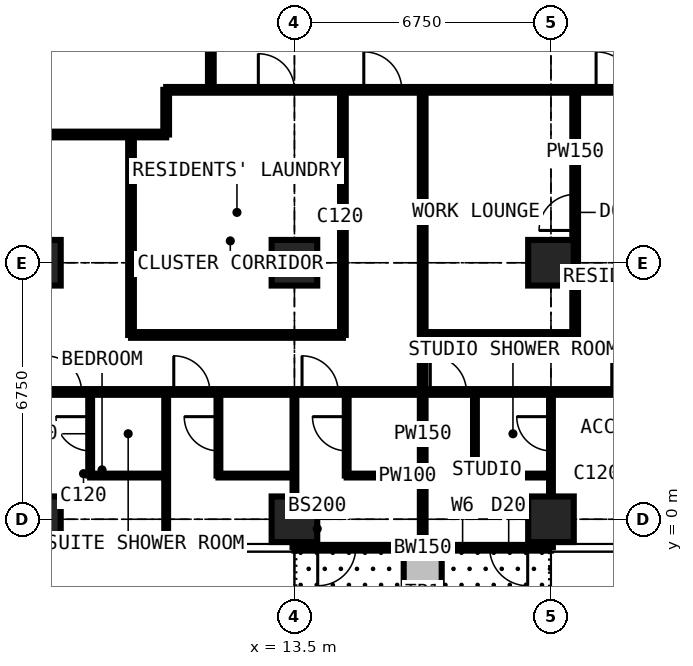
"""IFC4 building model, lengths in metres.
Left out: names, types, materials, properties, quantities, classifications, styles, units other than length and angle.
Written with IfcOpenShell. Run it as: python <this file> out.ifc"""

import sys

from ifc_helpers import new_model, si_unit, direction, frame, frame_2d, origin, origin_2d, place, context, subcontext, project, spatial, rectangle, extrude, element, fill, save


model = new_model("IFC4")
c1 = context("Model", 3, precision=1e-05, world=origin(), true_north=direction((0.0, 1.0)))
c2 = subcontext(c1, "Body", "Model", "MODEL_VIEW")
j1 = project(units=[si_unit("LENGTHUNIT", "METRE"), si_unit("PLANEANGLEUNIT", "RADIAN")], contexts=[c1])
p1 = place(None, origin())
s1 = spatial("IfcSite", under=j1, at=p1, CompositionType="ELEMENT")
p2 = place(p1, origin())
s2 = spatial("IfcBuilding", under=s1, at=p2, CompositionType="ELEMENT")
p3 = place(p2, frame((0.0, 0.0, 178.2)))
s3 = spatial("IfcBuildingStorey", under=s2, at=p3, CompositionType="ELEMENT", Elevation=178.2)
for number, where, z_axis, x_axis in (
    (1, (6.75, 0.0, 0.0), (0.0, 0.0, 1.0), (1.0, 0.0, 0.0)),
    (2, (6.75, 6.75, 0.0), (0.0, 0.0, 1.0), (1.0, 0.0, 0.0)),
    (3, (13.5, 0.0, 0.0), (0.0, 0.0, 1.0), (1.0, 0.0, 0.0)),
    (4, (13.5, 6.75, 0.0), (0.0, 0.0, 1.0), (1.0, 0.0, 0.0)),
    (5, (20.25, 0.0, 0.0), (0.0, 0.0, 1.0), (1.0, 0.0, 0.0)),
    (6, (20.25, 6.75, 0.0), (0.0, 0.0, 1.0), (1.0, 0.0, 0.0)),
):
    element("IfcColumn", number, at=place(p3, frame(where, z_axis=z_axis, x_axis=x_axis)), inside=s3, PredefinedType="COLUMN", context=c2, shape_type="SweptSolid", body=[
        extrude(rectangle(XDim=1.2, YDim=1.2, at=origin_2d()), origin(), (0.0, 0.0, 1.0), 3.6),
    ])
p4 = place(p3, frame((20.25, -0.75, 0.0), z_axis=(0.0, 0.0, 1.0), x_axis=(-1.0, 0.0, 0.0)))
e7 = element("IfcWall", 7, at=p4, inside=s3, PredefinedType="SOLIDWALL", context=c2, shape_type="SweptSolid", body=[
    extrude(rectangle(XDim=6.75, YDim=0.15, at=frame_2d((3.375, 0.0))), origin(), (0.0, 0.0, 1.0), 3.375),
])
p5 = place(p4, frame((0.613, 0.0, 0.0)))
e8 = element("IfcOpeningElement", 8, at=p5, cuts=e7, PredefinedType="OPENING", context=c2, shape_type="SweptSolid", body=[
    extrude(rectangle(XDim=1.0, YDim=2.2, at=frame_2d((0.5, 1.1))), frame((0.0, 0.085, 0.0), z_axis=(0.0, -1.0, 0.0), x_axis=(1.0, 0.0, 0.0)), (0.0, 0.0, 1.0), 0.17),
])
p6 = place(p4, frame((1.725, 0.0, 0.9)))
e9 = element("IfcOpeningElement", 9, at=p6, cuts=e7, PredefinedType="OPENING", context=c2, shape_type="SweptSolid", body=[
    extrude(rectangle(XDim=1.2, YDim=1.8, at=frame_2d((0.6, 0.9))), frame((0.0, 0.085, 0.0), z_axis=(0.0, -1.0, 0.0), x_axis=(1.0, 0.0, 0.0)), (0.0, 0.0, 1.0), 0.17),
])
p7 = place(p4, frame((5.137, 0.0, 0.0)))
e10 = element("IfcOpeningElement", 10, at=p7, cuts=e7, PredefinedType="OPENING", context=c2, shape_type="SweptSolid", body=[
    extrude(rectangle(XDim=1.0, YDim=2.2, at=frame_2d((0.5, 1.1))), frame((0.0, 0.085, 0.0), z_axis=(0.0, -1.0, 0.0), x_axis=(1.0, 0.0, 0.0)), (0.0, 0.0, 1.0), 0.17),
])
p8 = place(p4, frame((3.825, 0.0, 0.9)))
e11 = element("IfcOpeningElement", 11, at=p8, cuts=e7, PredefinedType="OPENING", context=c2, shape_type="SweptSolid", body=[
    extrude(rectangle(XDim=1.2, YDim=1.8, at=frame_2d((0.6, 0.9))), frame((0.0, 0.085, 0.0), z_axis=(0.0, -1.0, 0.0), x_axis=(1.0, 0.0, 0.0)), (0.0, 0.0, 1.0), 0.17),
])
p9 = place(p3, frame((16.875, -0.85, 0.0), z_axis=(0.0, 0.0, 1.0), x_axis=(0.0, -1.0, 0.0)))
e12 = element("IfcWall", 12, at=p9, inside=s3, PredefinedType="USERDEFINED", context=c2, shape_type="SweptSolid", body=[
    extrude(rectangle(XDim=2.2, YDim=1.0, at=frame_2d((1.1, 0.0))), origin(), (0.0, 0.0, 1.0), 0.9),
])
p10 = place(p3, frame((-0.734, 10.125, 0.0), z_axis=(0.0, 0.0, 1.0), x_axis=(1.0, 0.0, 0.0)))
e13 = element("IfcWall", 13, at=p10, inside=s3, PredefinedType="PARTITIONING", context=c2, shape_type="SweptSolid", body=[
    extrude(rectangle(XDim=10.859, YDim=0.15, at=frame_2d((5.429, 0.0))), origin(), (0.0, 0.0, 1.0), 3.375),
])
p11 = place(p10, frame((4.884, 0.0, 0.0)))
e14 = element("IfcOpeningElement", 14, at=p11, cuts=e13, PredefinedType="OPENING", context=c2, shape_type="SweptSolid", body=[
    extrude(rectangle(XDim=1.0, YDim=2.2, at=frame_2d((0.5, 1.1))), frame((0.0, 0.085, 0.0), z_axis=(0.0, -1.0, 0.0), x_axis=(1.0, 0.0, 0.0)), (0.0, 0.0, 1.0), 0.17),
])
p12 = place(p3, frame((6.75, 3.35, 0.0), z_axis=(0.0, 0.0, 1.0), x_axis=(1.0, 0.0, 0.0)))
e15 = element("IfcWall", 15, at=p12, inside=s3, PredefinedType="PARTITIONING", context=c2, shape_type="SweptSolid", body=[
    extrude(rectangle(XDim=20.25, YDim=0.15, at=frame_2d((10.125, 0.0))), origin(), (0.0, 0.0, 1.0), 3.375),
])
p13 = place(p12, frame((0.2, 0.0, 0.0)))
e16 = element("IfcOpeningElement", 16, at=p13, cuts=e15, PredefinedType="OPENING", context=c2, shape_type="SweptSolid", body=[
    extrude(rectangle(XDim=0.95, YDim=2.2, at=frame_2d((0.475, 1.1))), frame((0.0, 0.085, 0.0), z_axis=(0.0, -1.0, 0.0), x_axis=(1.0, 0.0, 0.0)), (0.0, 0.0, 1.0), 0.17),
])
p14 = place(p12, frame((3.575, 0.0, 0.0)))
e17 = element("IfcOpeningElement", 17, at=p14, cuts=e15, PredefinedType="OPENING", context=c2, shape_type="SweptSolid", body=[
    extrude(rectangle(XDim=0.95, YDim=2.2, at=frame_2d((0.475, 1.1))), frame((0.0, 0.085, 0.0), z_axis=(0.0, -1.0, 0.0), x_axis=(1.0, 0.0, 0.0)), (0.0, 0.0, 1.0), 0.17),
])
p15 = place(p12, frame((6.95, 0.0, 0.0)))
e18 = element("IfcOpeningElement", 18, at=p15, cuts=e15, PredefinedType="OPENING", context=c2, shape_type="SweptSolid", body=[
    extrude(rectangle(XDim=0.95, YDim=2.2, at=frame_2d((0.475, 1.1))), frame((0.0, 0.085, 0.0), z_axis=(0.0, -1.0, 0.0), x_axis=(1.0, 0.0, 0.0)), (0.0, 0.0, 1.0), 0.17),
])
p16 = place(p12, frame((15.1, 0.0, 0.0)))
e19 = element("IfcOpeningElement", 19, at=p16, cuts=e15, PredefinedType="OPENING", context=c2, shape_type="SweptSolid", body=[
    extrude(rectangle(XDim=0.95, YDim=2.2, at=frame_2d((0.475, 1.1))), frame((0.0, 0.085, 0.0), z_axis=(0.0, -1.0, 0.0), x_axis=(1.0, 0.0, 0.0)), (0.0, 0.0, 1.0), 0.17),
])
p17 = place(p12, frame((10.325, 0.0, 0.0)))
e20 = element("IfcOpeningElement", 20, at=p17, cuts=e15, PredefinedType="OPENING", context=c2, shape_type="SweptSolid", body=[
    extrude(rectangle(XDim=0.95, YDim=2.2, at=frame_2d((0.475, 1.1))), frame((0.0, 0.085, 0.0), z_axis=(0.0, -1.0, 0.0), x_axis=(1.0, 0.0, 0.0)), (0.0, 0.0, 1.0), 0.17),
])
p18 = place(p3, frame((8.125, 1.15, 0.0), z_axis=(0.0, 0.0, 1.0), x_axis=(0.0, 1.0, 0.0)))
e21 = element("IfcWall", 21, at=p18, inside=s3, PredefinedType="PARTITIONING", context=c2, shape_type="SweptSolid", body=[
    extrude(rectangle(XDim=2.2, YDim=0.1, at=frame_2d((1.1, 0.0))), origin(), (0.0, 0.0, 1.0), 3.375),
])
p19 = place(p18, frame((0.65, 0.0, 0.0)))
e22 = element("IfcOpeningElement", 22, at=p19, cuts=e21, PredefinedType="OPENING", context=c2, shape_type="SweptSolid", body=[
    extrude(rectangle(XDim=0.9, YDim=2.2, at=frame_2d((0.45, 1.1))), frame((0.0, 0.06, 0.0), z_axis=(0.0, -1.0, 0.0), x_axis=(1.0, 0.0, 0.0)), (0.0, 0.0, 1.0), 0.12),
])
p20 = place(p3, frame((8.125, 1.15, 0.0), z_axis=(0.0, 0.0, 1.0), x_axis=(1.0, 0.0, 0.0)))
e23 = element("IfcWall", 23, at=p20, inside=s3, PredefinedType="PARTITIONING", context=c2, shape_type="SweptSolid", body=[
    extrude(rectangle(XDim=2.0, YDim=0.1, at=frame_2d((1.0, 0.0))), origin(), (0.0, 0.0, 1.0), 3.375),
])
p21 = place(p3, frame((9.2, 4.85, 0.0), z_axis=(0.0, 0.0, 1.0), x_axis=(0.0, 1.0, 0.0)))
e24 = element("IfcWall", 24, at=p21, inside=s3, PredefinedType="PARTITIONING", context=c2, shape_type="SweptSolid", body=[
    extrude(rectangle(XDim=5.275, YDim=0.15, at=frame_2d((2.637, 0.0))), origin(), (0.0, 0.0, 1.0), 3.375),
])
p22 = place(p3, frame((9.2, 4.85, 0.0), z_axis=(0.0, 0.0, 1.0), x_axis=(1.0, 0.0, 0.0)))
e25 = element("IfcWall", 25, at=p22, inside=s3, PredefinedType="PARTITIONING", context=c2, shape_type="SweptSolid", body=[
    extrude(rectangle(XDim=5.575, YDim=0.15, at=frame_2d((2.788, 0.0))), origin(), (0.0, 0.0, 1.0), 3.375),
])
p23 = place(p3, frame((10.125, -0.734, 0.0), z_axis=(0.0, 0.0, 1.0), x_axis=(0.0, 1.0, 0.0)))
e26 = element("IfcWall", 26, at=p23, inside=s3, PredefinedType="PARTITIONING", context=c2, shape_type="SweptSolid", body=[
    extrude(rectangle(XDim=4.084, YDim=0.1, at=frame_2d((2.042, 0.0))), origin(), (0.0, 0.0, 1.0), 3.375),
])
p24 = place(p3, frame((10.125, 10.125, 0.0), z_axis=(0.0, 0.0, 1.0), x_axis=(0.0, 1.0, 0.0)))
e27 = element("IfcWall", 27, at=p24, inside=s3, PredefinedType="PARTITIONING", context=c2, shape_type="SweptSolid", body=[
    extrude(rectangle(XDim=1.175, YDim=0.15, at=frame_2d((0.587, 0.0))), origin(), (0.0, 0.0, 1.0), 3.375),
])
p25 = place(p3, frame((10.125, 11.3, 0.0), z_axis=(0.0, 0.0, 1.0), x_axis=(1.0, 0.0, 0.0)))
e28 = element("IfcWall", 28, at=p25, inside=s3, PredefinedType="PARTITIONING", context=c2, shape_type="SweptSolid", body=[
    extrude(rectangle(XDim=20.25, YDim=0.15, at=frame_2d((10.125, 0.0))), origin(), (0.0, 0.0, 1.0), 3.375),
])
p26 = place(p25, frame((5.2, 0.0, 0.0)))
e29 = element("IfcOpeningElement", 29, at=p26, cuts=e28, PredefinedType="OPENING", context=c2, shape_type="SweptSolid", body=[
    extrude(rectangle(XDim=1.0, YDim=2.2, at=frame_2d((0.5, 1.1))), frame((0.0, 0.085, 0.0), z_axis=(0.0, -1.0, 0.0), x_axis=(1.0, 0.0, 0.0)), (0.0, 0.0, 1.0), 0.17),
])
p27 = place(p25, frame((11.312, 0.0, 0.0)))
e30 = element("IfcOpeningElement", 30, at=p27, cuts=e28, PredefinedType="OPENING", context=c2, shape_type="SweptSolid", body=[
    extrude(rectangle(XDim=1.0, YDim=2.2, at=frame_2d((0.5, 1.1))), frame((0.0, 0.085, 0.0), z_axis=(0.0, -1.0, 0.0), x_axis=(1.0, 0.0, 0.0)), (0.0, 0.0, 1.0), 0.17),
])
p28 = place(p25, frame((2.425, 0.0, 0.0)))
e31 = element("IfcOpeningElement", 31, at=p28, cuts=e28, PredefinedType="OPENING", context=c2, shape_type="SweptSolid", body=[
    extrude(rectangle(XDim=0.95, YDim=2.2, at=frame_2d((0.475, 1.1))), frame((0.0, 0.085, 0.0), z_axis=(0.0, -1.0, 0.0), x_axis=(1.0, 0.0, 0.0)), (0.0, 0.0, 1.0), 0.17),
])
p29 = place(p3, frame((11.3, 11.3, 0.0), z_axis=(0.0, 0.0, 1.0), x_axis=(0.0, 1.0, 0.0)))
e32 = element("IfcWall", 32, at=p29, inside=s3, PredefinedType="PARTITIONING", context=c2, shape_type="SweptSolid", body=[
    extrude(rectangle(XDim=19.3, YDim=0.15, at=frame_2d((9.65, 0.0))), origin(), (0.0, 0.0, 1.0), 3.375),
])
p30 = place(p29, frame((13.525, 0.0, 0.0)))
e33 = element("IfcOpeningElement", 33, at=p30, cuts=e32, PredefinedType="OPENING", context=c2, shape_type="SweptSolid", body=[
    extrude(rectangle(XDim=1.0, YDim=2.2, at=frame_2d((0.5, 1.1))), frame((0.0, 0.085, 0.0), z_axis=(0.0, -1.0, 0.0), x_axis=(1.0, 0.0, 0.0)), (0.0, 0.0, 1.0), 0.17),
])
p31 = place(p29, frame((10.438, 0.0, 0.0)))
e34 = element("IfcOpeningElement", 34, at=p31, cuts=e32, PredefinedType="OPENING", context=c2, shape_type="SweptSolid", body=[
    extrude(rectangle(XDim=1.0, YDim=2.2, at=frame_2d((0.5, 1.1))), frame((0.0, 0.085, 0.0), z_axis=(0.0, -1.0, 0.0), x_axis=(1.0, 0.0, 0.0)), (0.0, 0.0, 1.0), 0.17),
])
p32 = place(p3, frame((11.5, 1.15, 0.0), z_axis=(0.0, 0.0, 1.0), x_axis=(0.0, 1.0, 0.0)))
e35 = element("IfcWall", 35, at=p32, inside=s3, PredefinedType="PARTITIONING", context=c2, shape_type="SweptSolid", body=[
    extrude(rectangle(XDim=2.2, YDim=0.1, at=frame_2d((1.1, 0.0))), origin(), (0.0, 0.0, 1.0), 3.375),
])
p33 = place(p32, frame((0.65, 0.0, 0.0)))
e36 = element("IfcOpeningElement", 36, at=p33, cuts=e35, PredefinedType="OPENING", context=c2, shape_type="SweptSolid", body=[
    extrude(rectangle(XDim=0.9, YDim=2.2, at=frame_2d((0.45, 1.1))), frame((0.0, 0.06, 0.0), z_axis=(0.0, -1.0, 0.0), x_axis=(1.0, 0.0, 0.0)), (0.0, 0.0, 1.0), 0.12),
])
p34 = place(p3, frame((11.5, 1.15, 0.0), z_axis=(0.0, 0.0, 1.0), x_axis=(1.0, 0.0, 0.0)))
e37 = element("IfcWall", 37, at=p34, inside=s3, PredefinedType="PARTITIONING", context=c2, shape_type="SweptSolid", body=[
    extrude(rectangle(XDim=2.0, YDim=0.1, at=frame_2d((1.0, 0.0))), origin(), (0.0, 0.0, 1.0), 3.375),
])
p35 = place(p3, frame((13.5, -0.734, 0.0), z_axis=(0.0, 0.0, 1.0), x_axis=(0.0, 1.0, 0.0)))
e38 = element("IfcWall", 38, at=p35, inside=s3, PredefinedType="PARTITIONING", context=c2, shape_type="SweptSolid", body=[
    extrude(rectangle(XDim=4.084, YDim=0.1, at=frame_2d((2.042, 0.0))), origin(), (0.0, 0.0, 1.0), 2.877),
])
p36 = place(p3, frame((14.775, 4.85, 0.0), z_axis=(0.0, 0.0, 1.0), x_axis=(0.0, 1.0, 0.0)))
e39 = element("IfcWall", 39, at=p36, inside=s3, PredefinedType="PARTITIONING", context=c2, shape_type="SweptSolid", body=[
    extrude(rectangle(XDim=6.45, YDim=0.15, at=frame_2d((3.225, 0.0))), origin(), (0.0, 0.0, 1.0), 3.375),
])
p37 = place(p3, frame((14.875, 1.15, 0.0), z_axis=(0.0, 0.0, 1.0), x_axis=(0.0, 1.0, 0.0)))
e40 = element("IfcWall", 40, at=p37, inside=s3, PredefinedType="PARTITIONING", context=c2, shape_type="SweptSolid", body=[
    extrude(rectangle(XDim=2.2, YDim=0.1, at=frame_2d((1.1, 0.0))), origin(), (0.0, 0.0, 1.0), 3.375),
])
p38 = place(p37, frame((0.65, 0.0, 0.0)))
e41 = element("IfcOpeningElement", 41, at=p38, cuts=e40, PredefinedType="OPENING", context=c2, shape_type="SweptSolid", body=[
    extrude(rectangle(XDim=0.9, YDim=2.2, at=frame_2d((0.45, 1.1))), frame((0.0, 0.06, 0.0), z_axis=(0.0, -1.0, 0.0), x_axis=(1.0, 0.0, 0.0)), (0.0, 0.0, 1.0), 0.12),
])
p39 = place(p3, frame((14.875, 1.15, 0.0), z_axis=(0.0, 0.0, 1.0), x_axis=(1.0, 0.0, 0.0)))
e42 = element("IfcWall", 42, at=p39, inside=s3, PredefinedType="PARTITIONING", context=c2, shape_type="SweptSolid", body=[
    extrude(rectangle(XDim=2.0, YDim=0.1, at=frame_2d((1.0, 0.0))), origin(), (0.0, 0.0, 1.0), 3.375),
])
p40 = place(p3, frame((16.875, -0.734, 0.0), z_axis=(0.0, 0.0, 1.0), x_axis=(0.0, 1.0, 0.0)))
e43 = element("IfcWall", 43, at=p40, inside=s3, PredefinedType="PARTITIONING", context=c2, shape_type="SweptSolid", body=[
    extrude(rectangle(XDim=12.034, YDim=0.15, at=frame_2d((6.017, 0.0))), origin(), (0.0, 0.0, 1.0), 3.375),
])
p41 = place(p3, frame((16.875, 4.85, 0.0), z_axis=(0.0, 0.0, 1.0), x_axis=(1.0, 0.0, 0.0)))
e44 = element("IfcWall", 44, at=p41, inside=s3, PredefinedType="PARTITIONING", context=c2, shape_type="SweptSolid", body=[
    extrude(rectangle(XDim=4.012, YDim=0.15, at=frame_2d((2.006, 0.0))), origin(), (0.0, 0.0, 1.0), 3.375),
])
p42 = place(p3, frame((18.25, 1.15, 0.0), z_axis=(0.0, 0.0, 1.0), x_axis=(0.0, 1.0, 0.0)))
e45 = element("IfcWall", 45, at=p42, inside=s3, PredefinedType="PARTITIONING", context=c2, shape_type="SweptSolid", body=[
    extrude(rectangle(XDim=2.2, YDim=0.1, at=frame_2d((1.1, 0.0))), origin(), (0.0, 0.0, 1.0), 3.375),
])
p43 = place(p3, frame((18.25, 1.15, 0.0), z_axis=(0.0, 0.0, 1.0), x_axis=(1.0, 0.0, 0.0)))
e46 = element("IfcWall", 46, at=p43, inside=s3, PredefinedType="PARTITIONING", context=c2, shape_type="SweptSolid", body=[
    extrude(rectangle(XDim=2.0, YDim=0.1, at=frame_2d((1.0, 0.0))), origin(), (0.0, 0.0, 1.0), 3.375),
])
p44 = place(p3, frame((20.25, -0.734, 0.0), z_axis=(0.0, 0.0, 1.0), x_axis=(0.0, 1.0, 0.0)))
e47 = element("IfcWall", 47, at=p44, inside=s3, PredefinedType="PARTITIONING", context=c2, shape_type="SweptSolid", body=[
    extrude(rectangle(XDim=4.084, YDim=0.1, at=frame_2d((2.042, 0.0))), origin(), (0.0, 0.0, 1.0), 2.877),
])
p45 = place(p44, frame((2.534, 0.0, 0.0)))
e48 = element("IfcOpeningElement", 48, at=p45, cuts=e47, PredefinedType="OPENING", context=c2, shape_type="SweptSolid", body=[
    extrude(rectangle(XDim=0.9, YDim=2.2, at=frame_2d((0.45, 1.1))), frame((0.0, 0.06, 0.0), z_axis=(0.0, -1.0, 0.0), x_axis=(1.0, 0.0, 0.0)), (0.0, 0.0, 1.0), 0.12),
])
p46 = place(p3, frame((20.887, 4.85, 0.0), z_axis=(0.0, 0.0, 1.0), x_axis=(0.0, 1.0, 0.0)))
e49 = element("IfcWall", 49, at=p46, inside=s3, PredefinedType="PARTITIONING", context=c2, shape_type="SweptSolid", body=[
    extrude(rectangle(XDim=6.45, YDim=0.15, at=frame_2d((3.225, 0.0))), origin(), (0.0, 0.0, 1.0), 3.375),
])
p47 = place(p46, frame((2.75, 0.0, 0.0)))
e50 = element("IfcOpeningElement", 50, at=p47, cuts=e49, PredefinedType="OPENING", context=c2, shape_type="SweptSolid", body=[
    extrude(rectangle(XDim=0.95, YDim=2.2, at=frame_2d((0.475, 1.1))), frame((0.0, 0.085, 0.0), z_axis=(0.0, -1.0, 0.0), x_axis=(1.0, 0.0, 0.0)), (0.0, 0.0, 1.0), 0.17),
])
p48 = place(p5, origin())
e51 = element("IfcDoor", 51, at=p48, inside=s3, OperationType="SINGLE_SWING_LEFT", PredefinedType="DOOR", context=c2, shape_type="SweptSolid", body=[
    extrude(rectangle(XDim=1.0, YDim=2.2, at=frame_2d((0.5, 1.1))), frame((0.0, 0.025, 0.0), z_axis=(0.0, -1.0, 0.0), x_axis=(1.0, 0.0, 0.0)), (0.0, 0.0, 1.0), 0.05),
])
fill(e8, e51)
p49 = place(p6, origin())
e52 = element("IfcWindow", 52, at=p49, inside=s3, PartitioningType="SINGLE_PANEL", PredefinedType="WINDOW", context=c2, shape_type="SweptSolid", body=[
    extrude(rectangle(XDim=1.2, YDim=1.8, at=frame_2d((0.6, 0.9))), frame((0.0, 0.03, 0.0), z_axis=(0.0, -1.0, 0.0), x_axis=(1.0, 0.0, 0.0)), (0.0, 0.0, 1.0), 0.06),
])
fill(e9, e52)
p50 = place(p7, origin())
e53 = element("IfcDoor", 53, at=p50, inside=s3, OperationType="SINGLE_SWING_RIGHT", PredefinedType="DOOR", context=c2, shape_type="SweptSolid", body=[
    extrude(rectangle(XDim=1.0, YDim=2.2, at=frame_2d((0.5, 1.1))), frame((0.0, 0.025, 0.0), z_axis=(0.0, -1.0, 0.0), x_axis=(1.0, 0.0, 0.0)), (0.0, 0.0, 1.0), 0.05),
])
fill(e10, e53)
p51 = place(p8, origin())
e54 = element("IfcWindow", 54, at=p51, inside=s3, PartitioningType="SINGLE_PANEL", PredefinedType="WINDOW", context=c2, shape_type="SweptSolid", body=[
    extrude(rectangle(XDim=1.2, YDim=1.8, at=frame_2d((0.6, 0.9))), frame((0.0, 0.03, 0.0), z_axis=(0.0, -1.0, 0.0), x_axis=(1.0, 0.0, 0.0)), (0.0, 0.0, 1.0), 0.06),
])
fill(e11, e54)
p52 = place(p13, origin())
e55 = element("IfcDoor", 55, at=p52, inside=s3, OperationType="SINGLE_SWING_LEFT", PredefinedType="DOOR", context=c2, shape_type="SweptSolid", body=[
    extrude(rectangle(XDim=0.95, YDim=2.2, at=frame_2d((0.475, 1.1))), frame((0.0, 0.025, 0.0), z_axis=(0.0, -1.0, 0.0), x_axis=(1.0, 0.0, 0.0)), (0.0, 0.0, 1.0), 0.05),
])
fill(e16, e55)
p53 = place(p19, origin())
e56 = element("IfcDoor", 56, at=p53, inside=s3, OperationType="SINGLE_SWING_RIGHT", PredefinedType="DOOR", context=c2, shape_type="SweptSolid", body=[
    extrude(rectangle(XDim=0.9, YDim=2.2, at=frame_2d((0.45, 1.1))), frame((0.0, 0.025, 0.0), z_axis=(0.0, -1.0, 0.0), x_axis=(1.0, 0.0, 0.0)), (0.0, 0.0, 1.0), 0.05),
])
fill(e22, e56)
p54 = place(p14, origin())
e57 = element("IfcDoor", 57, at=p54, inside=s3, OperationType="SINGLE_SWING_LEFT", PredefinedType="DOOR", context=c2, shape_type="SweptSolid", body=[
    extrude(rectangle(XDim=0.95, YDim=2.2, at=frame_2d((0.475, 1.1))), frame((0.0, 0.025, 0.0), z_axis=(0.0, -1.0, 0.0), x_axis=(1.0, 0.0, 0.0)), (0.0, 0.0, 1.0), 0.05),
])
fill(e17, e57)
p55 = place(p33, origin())
e58 = element("IfcDoor", 58, at=p55, inside=s3, OperationType="SINGLE_SWING_RIGHT", PredefinedType="DOOR", context=c2, shape_type="SweptSolid", body=[
    extrude(rectangle(XDim=0.9, YDim=2.2, at=frame_2d((0.45, 1.1))), frame((0.0, 0.025, 0.0), z_axis=(0.0, -1.0, 0.0), x_axis=(1.0, 0.0, 0.0)), (0.0, 0.0, 1.0), 0.05),
])
fill(e36, e58)
p56 = place(p15, origin())
e59 = element("IfcDoor", 59, at=p56, inside=s3, OperationType="SINGLE_SWING_LEFT", PredefinedType="DOOR", context=c2, shape_type="SweptSolid", body=[
    extrude(rectangle(XDim=0.95, YDim=2.2, at=frame_2d((0.475, 1.1))), frame((0.0, 0.025, 0.0), z_axis=(0.0, -1.0, 0.0), x_axis=(1.0, 0.0, 0.0)), (0.0, 0.0, 1.0), 0.05),
])
fill(e18, e59)
p57 = place(p38, origin())
e60 = element("IfcDoor", 60, at=p57, inside=s3, OperationType="SINGLE_SWING_RIGHT", PredefinedType="DOOR", context=c2, shape_type="SweptSolid", body=[
    extrude(rectangle(XDim=0.9, YDim=2.2, at=frame_2d((0.45, 1.1))), frame((0.0, 0.025, 0.0), z_axis=(0.0, -1.0, 0.0), x_axis=(1.0, 0.0, 0.0)), (0.0, 0.0, 1.0), 0.05),
])
fill(e41, e60)
p58 = place(p26, origin())
e61 = element("IfcDoor", 61, at=p58, inside=s3, OperationType="SINGLE_SWING_LEFT", PredefinedType="DOOR", context=c2, shape_type="SweptSolid", body=[
    extrude(rectangle(XDim=1.0, YDim=2.2, at=frame_2d((0.5, 1.1))), frame((0.0, 0.025, 0.0), z_axis=(0.0, -1.0, 0.0), x_axis=(1.0, 0.0, 0.0)), (0.0, 0.0, 1.0), 0.05),
])
fill(e29, e61)
p59 = place(p16, origin())
e62 = element("IfcDoor", 62, at=p59, inside=s3, OperationType="SINGLE_SWING_LEFT", PredefinedType="DOOR", context=c2, shape_type="SweptSolid", body=[
    extrude(rectangle(XDim=0.95, YDim=2.2, at=frame_2d((0.475, 1.1))), frame((0.0, 0.025, 0.0), z_axis=(0.0, -1.0, 0.0), x_axis=(1.0, 0.0, 0.0)), (0.0, 0.0, 1.0), 0.05),
])
fill(e19, e62)
p60 = place(p17, origin())
e63 = element("IfcDoor", 63, at=p60, inside=s3, OperationType="SINGLE_SWING_LEFT", PredefinedType="DOOR", context=c2, shape_type="SweptSolid", body=[
    extrude(rectangle(XDim=0.95, YDim=2.2, at=frame_2d((0.475, 1.1))), frame((0.0, 0.025, 0.0), z_axis=(0.0, -1.0, 0.0), x_axis=(1.0, 0.0, 0.0)), (0.0, 0.0, 1.0), 0.05),
])
fill(e20, e63)
p61 = place(p45, origin())
e64 = element("IfcDoor", 64, at=p61, inside=s3, OperationType="SINGLE_SWING_RIGHT", PredefinedType="DOOR", context=c2, shape_type="SweptSolid", body=[
    extrude(rectangle(XDim=0.9, YDim=2.2, at=frame_2d((0.45, 1.1))), frame((0.0, 0.025, 0.0), z_axis=(0.0, -1.0, 0.0), x_axis=(1.0, 0.0, 0.0)), (0.0, 0.0, 1.0), 0.05),
])
fill(e48, e64)
p62 = place(p27, origin())
e65 = element("IfcDoor", 65, at=p62, inside=s3, OperationType="SINGLE_SWING_LEFT", PredefinedType="DOOR", context=c2, shape_type="SweptSolid", body=[
    extrude(rectangle(XDim=1.0, YDim=2.2, at=frame_2d((0.5, 1.1))), frame((0.0, 0.025, 0.0), z_axis=(0.0, -1.0, 0.0), x_axis=(1.0, 0.0, 0.0)), (0.0, 0.0, 1.0), 0.05),
])
fill(e30, e65)
p63 = place(p28, origin())
e66 = element("IfcDoor", 66, at=p63, inside=s3, OperationType="SINGLE_SWING_LEFT", PredefinedType="DOOR", context=c2, shape_type="SweptSolid", body=[
    extrude(rectangle(XDim=0.95, YDim=2.2, at=frame_2d((0.475, 1.1))), frame((0.0, 0.025, 0.0), z_axis=(0.0, -1.0, 0.0), x_axis=(1.0, 0.0, 0.0)), (0.0, 0.0, 1.0), 0.05),
])
fill(e31, e66)
p64 = place(p47, origin())
e67 = element("IfcDoor", 67, at=p64, inside=s3, OperationType="SINGLE_SWING_LEFT", PredefinedType="DOOR", context=c2, shape_type="SweptSolid", body=[
    extrude(rectangle(XDim=0.95, YDim=2.2, at=frame_2d((0.475, 1.1))), frame((0.0, 0.025, 0.0), z_axis=(0.0, -1.0, 0.0), x_axis=(1.0, 0.0, 0.0)), (0.0, 0.0, 1.0), 0.05),
])
fill(e50, e67)
save(model, sys.argv[1])
